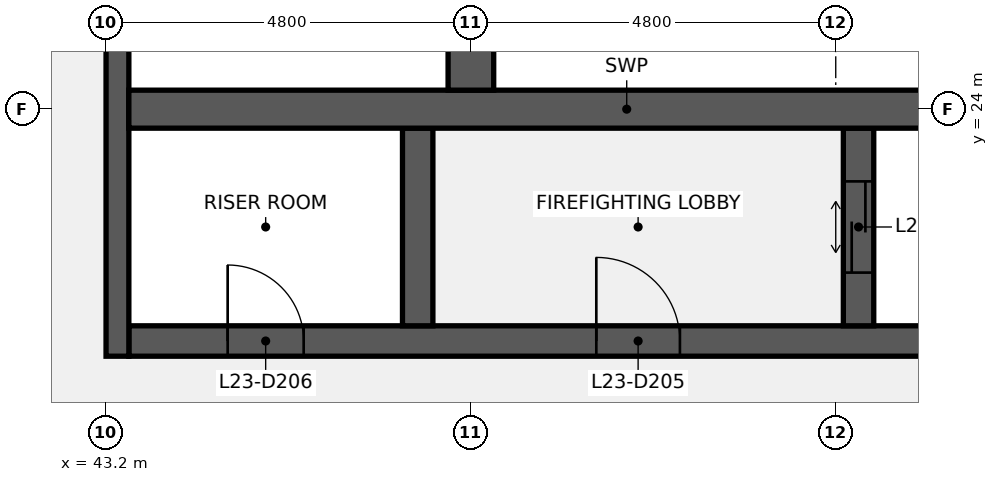
"""IFC4 building model, lengths in metres.
Left out: names, types, materials, properties, quantities, classifications, styles, units other than length and angle.
Written with IfcOpenShell. Run it as: python <this file> out.ifc"""

import sys

from ifc_helpers import new_model, si_unit, direction, frame, frame_2d, origin, place, context, subcontext, project, spatial, rectangle, extrude, element, fill, save


model = new_model("IFC4")
c1 = context("Model", 3, precision=1e-05, world=origin(), true_north=direction((0.0, 1.0)))
c2 = subcontext(c1, "Body", "Model", "MODEL_VIEW")
j1 = project(units=[si_unit("LENGTHUNIT", "METRE"), si_unit("PLANEANGLEUNIT", "RADIAN")], contexts=[c1])
p1 = place(None, origin())
s1 = spatial("IfcSite", under=j1, at=p1, CompositionType="ELEMENT")
p2 = place(p1, origin())
s2 = spatial("IfcBuilding", under=s1, at=p2, CompositionType="ELEMENT")
p3 = place(p2, frame((0.0, 0.0, 112.1)))
s3 = spatial("IfcBuildingStorey", under=s2, at=p3, CompositionType="ELEMENT", Elevation=112.1)
p4 = place(p3, frame((43.5, 20.95, 0.0), z_axis=(0.0, 0.0, 1.0), x_axis=(1.0, 0.0, 0.0)))
e1 = element("IfcWall", 1, at=p4, inside=s3, PredefinedType="SHEAR", context=c2, shape_type="SweptSolid", body=[
    extrude(rectangle(XDim=13.1, YDim=0.4, at=frame_2d((6.55, 0.0))), origin(), (0.0, 0.0, 1.0), 3.84),
])
p5 = place(p4, frame((6.15, 0.0, 0.0)))
e2 = element("IfcOpeningElement", 2, at=p5, cuts=e1, PredefinedType="OPENING", context=c2, shape_type="SweptSolid", body=[
    extrude(rectangle(XDim=1.1, YDim=2.1, at=frame_2d((0.55, 1.05))), frame((0.0, 0.21, 0.0), z_axis=(0.0, -1.0, 0.0), x_axis=(1.0, 0.0, 0.0)), (0.0, 0.0, 1.0), 0.42),
])
p6 = place(p4, frame((1.3, 0.0, 0.0)))
e3 = element("IfcOpeningElement", 3, at=p6, cuts=e1, PredefinedType="OPENING", context=c2, shape_type="SweptSolid", body=[
    extrude(rectangle(XDim=1.0, YDim=2.1, at=frame_2d((0.5, 1.05))), frame((0.0, 0.21, 0.0), z_axis=(0.0, -1.0, 0.0), x_axis=(1.0, 0.0, 0.0)), (0.0, 0.0, 1.0), 0.42),
])
p7 = place(p3, frame((43.35, 20.75, 0.0), z_axis=(0.0, 0.0, 1.0), x_axis=(0.0, 1.0, 0.0)))
e4 = element("IfcWall", 4, at=p7, inside=s3, PredefinedType="SHEAR", context=c2, shape_type="SweptSolid", body=[
    extrude(rectangle(XDim=6.5, YDim=0.3, at=frame_2d((3.25, 0.0))), origin(), (0.0, 0.0, 1.0), 3.84),
])
p8 = place(p3, frame((53.1, 21.15, 0.0), z_axis=(0.0, 0.0, 1.0), x_axis=(0.0, 1.0, 0.0)))
e5 = element("IfcWall", 5, at=p8, inside=s3, PredefinedType="SHEAR", context=c2, shape_type="SweptSolid", body=[
    extrude(rectangle(XDim=2.6, YDim=0.4, at=frame_2d((1.3, 0.0))), origin(), (0.0, 0.0, 1.0), 3.84),
])
p9 = place(p8, frame((0.7, 0.0, 0.0)))
e6 = element("IfcOpeningElement", 6, at=p9, cuts=e5, PredefinedType="OPENING", context=c2, shape_type="SweptSolid", body=[
    extrude(rectangle(XDim=1.2, YDim=2.1, at=frame_2d((0.6, 1.05))), frame((0.0, 0.21, 0.0), z_axis=(0.0, -1.0, 0.0), x_axis=(1.0, 0.0, 0.0)), (0.0, 0.0, 1.0), 0.42),
])
p10 = place(p3, frame((47.3, 21.15, 0.0), z_axis=(0.0, 0.0, 1.0), x_axis=(0.0, 1.0, 0.0)))
e7 = element("IfcWall", 7, at=p10, inside=s3, PredefinedType="SHEAR", context=c2, shape_type="SweptSolid", body=[
    extrude(rectangle(XDim=2.6, YDim=0.4, at=frame_2d((1.3, 0.0))), origin(), (0.0, 0.0, 1.0), 3.84),
])
p11 = place(p3, frame((43.5, 24.0, 0.0), z_axis=(0.0, 0.0, 1.0), x_axis=(1.0, 0.0, 0.0)))
e8 = element("IfcWall", 8, at=p11, inside=s3, PredefinedType="SHEAR", context=c2, shape_type="SweptSolid", body=[
    extrude(rectangle(XDim=13.1, YDim=0.5, at=frame_2d((6.55, 0.0))), origin(), (0.0, 0.0, 1.0), 3.84),
])
p12 = place(p3, frame((48.0, 24.25, 0.0), z_axis=(0.0, 0.0, 1.0), x_axis=(0.0, 1.0, 0.0)))
e9 = element("IfcWall", 9, at=p12, inside=s3, PredefinedType="SHEAR", context=c2, shape_type="SweptSolid", body=[
    extrude(rectangle(XDim=2.6, YDim=0.6, at=frame_2d((1.3, 0.0))), origin(), (0.0, 0.0, 1.0), 3.84),
])
p13 = place(p5, origin())
e10 = element("IfcDoor", 10, at=p13, inside=s3, OperationType="SINGLE_SWING_LEFT", PredefinedType="DOOR", context=c2, shape_type="SweptSolid", body=[
    extrude(rectangle(XDim=1.1, YDim=2.1, at=frame_2d((0.55, 1.05))), frame((0.0, 0.025, 0.0), z_axis=(0.0, -1.0, 0.0), x_axis=(1.0, 0.0, 0.0)), (0.0, 0.0, 1.0), 0.05),
])
fill(e2, e10)
p14 = place(p6, origin())
e11 = element("IfcDoor", 11, at=p14, inside=s3, OperationType="SINGLE_SWING_LEFT", PredefinedType="DOOR", context=c2, shape_type="SweptSolid", body=[
    extrude(rectangle(XDim=1.0, YDim=2.1, at=frame_2d((0.5, 1.05))), frame((0.0, 0.025, 0.0), z_axis=(0.0, -1.0, 0.0), x_axis=(1.0, 0.0, 0.0)), (0.0, 0.0, 1.0), 0.05),
])
fill(e3, e11)
p15 = place(p9, origin())
e12 = element("IfcDoor", 12, at=p15, inside=s3, OperationType="DOUBLE_DOOR_SLIDING", PredefinedType="DOOR", context=c2, shape_type="SweptSolid", body=[
    extrude(rectangle(XDim=1.2, YDim=2.1, at=frame_2d((0.6, 1.05))), frame((0.0, 0.025, 0.0), z_axis=(0.0, -1.0, 0.0), x_axis=(1.0, 0.0, 0.0)), (0.0, 0.0, 1.0), 0.05),
])
fill(e6, e12)
save(model, sys.argv[1])
